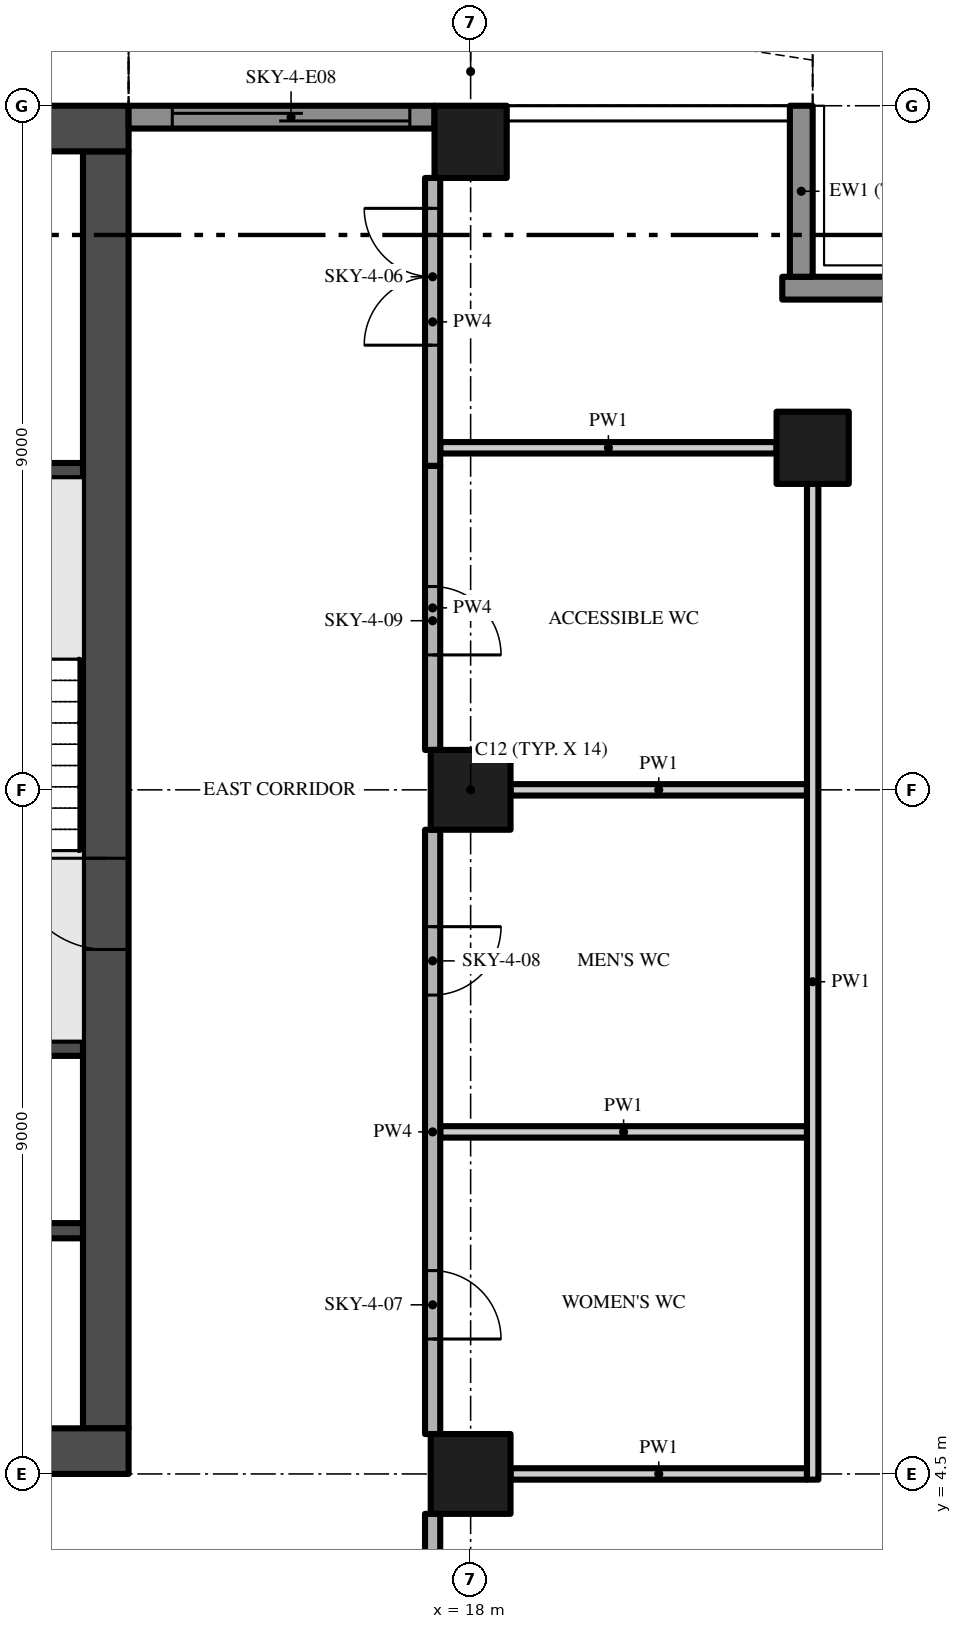
"""IFC4 building model, lengths in metres.
Left out: names, types, materials, properties, quantities, classifications, styles, units other than length and angle.
Written with IfcOpenShell. Run it as: python <this file> out.ifc"""

import sys

from ifc_helpers import new_model, si_unit, direction, frame, frame_2d, origin, origin_2d, place, context, subcontext, project, spatial, polyline, rectangle, outline, extrude, element, fill, save


model = new_model("IFC4")
c1 = context("Model", 3, precision=1e-05, world=origin(), true_north=direction((0.0, 1.0)))
c2 = subcontext(c1, "Body", "Model", "MODEL_VIEW")
j1 = project(units=[si_unit("LENGTHUNIT", "METRE"), si_unit("PLANEANGLEUNIT", "RADIAN")], contexts=[c1])
p1 = place(None, origin())
s1 = spatial("IfcSite", under=j1, at=p1, CompositionType="ELEMENT")
p2 = place(p1, origin())
s2 = spatial("IfcBuilding", under=s1, at=p2, CompositionType="ELEMENT")
p3 = place(p2, frame((0.0, 0.0, 233.8)))
s3 = spatial("IfcBuildingStorey", under=s2, at=p3, CompositionType="ELEMENT", Elevation=233.8)
p4 = place(p3, frame((-13.5, 4.8, -0.3), z_axis=(0.0, 0.0, 1.0), x_axis=(1.0, 0.0, 0.0)))
e1 = element("IfcWall", 1, at=p4, inside=s3, PredefinedType="SHEAR", context=c2, shape_type="SweptSolid", body=[
    extrude(rectangle(XDim=27.0, YDim=0.6, at=frame_2d((13.5, 0.0))), origin(), (0.0, 0.0, 1.0), 5.0),
])
p5 = place(p4, frame((12.0, 0.0, 0.3)))
e2 = element("IfcOpeningElement", 2, at=p5, cuts=e1, PredefinedType="OPENING", context=c2, shape_type="SweptSolid", body=[
    extrude(rectangle(XDim=3.0, YDim=2.4, at=frame_2d((1.5, 1.2))), frame((0.0, 0.31, 0.0), z_axis=(0.0, -1.0, 0.0), x_axis=(1.0, 0.0, 0.0)), (0.0, 0.0, 1.0), 0.62),
])
p6 = place(p4, frame((4.9, 0.0, 0.3)))
e3 = element("IfcOpeningElement", 3, at=p6, cuts=e1, PredefinedType="OPENING", context=c2, shape_type="SweptSolid", body=[
    extrude(rectangle(XDim=1.2, YDim=2.2, at=frame_2d((0.6, 1.1))), frame((0.0, 0.31, 0.0), z_axis=(0.0, -1.0, 0.0), x_axis=(1.0, 0.0, 0.0)), (0.0, 0.0, 1.0), 0.62),
])
p7 = place(p4, frame((20.75, 0.0, 0.3)))
e4 = element("IfcOpeningElement", 4, at=p7, cuts=e1, PredefinedType="OPENING", context=c2, shape_type="SweptSolid", body=[
    extrude(rectangle(XDim=1.5, YDim=2.2, at=frame_2d((0.75, 1.1))), frame((0.0, 0.31, 0.0), z_axis=(0.0, -1.0, 0.0), x_axis=(1.0, 0.0, 0.0)), (0.0, 0.0, 1.0), 0.62),
])
p8 = place(p4, frame((17.4, 0.0, 0.3)))
e5 = element("IfcOpeningElement", 5, at=p8, cuts=e1, PredefinedType="OPENING", context=c2, shape_type="SweptSolid", body=[
    extrude(rectangle(XDim=1.2, YDim=2.2, at=frame_2d((0.6, 1.1))), frame((0.0, 0.31, 0.0), z_axis=(0.0, -1.0, 0.0), x_axis=(1.0, 0.0, 0.0)), (0.0, 0.0, 1.0), 0.62),
])
p9 = place(p3, frame((13.2, 5.1, -0.3), z_axis=(0.0, 0.0, 1.0), x_axis=(0.0, 1.0, 0.0)))
e6 = element("IfcWall", 6, at=p9, inside=s3, PredefinedType="SHEAR", context=c2, shape_type="SweptSolid", body=[
    extrude(rectangle(XDim=16.8, YDim=0.6, at=frame_2d((8.4, 0.0))), origin(), (0.0, 0.0, 1.0), 5.0),
])
p10 = place(p9, frame((6.3, 0.0, 0.3)))
e7 = element("IfcOpeningElement", 7, at=p10, cuts=e6, PredefinedType="OPENING", context=c2, shape_type="SweptSolid", body=[
    extrude(rectangle(XDim=1.2, YDim=2.2, at=frame_2d((0.6, 1.1))), frame((0.0, 0.31, 0.0), z_axis=(0.0, -1.0, 0.0), x_axis=(1.0, 0.0, 0.0)), (0.0, 0.0, 1.0), 0.62),
])
p11 = place(p3, frame((13.5, 22.2, -0.3), z_axis=(0.0, 0.0, 1.0), x_axis=(-1.0, 0.0, 0.0)))
e8 = element("IfcWall", 8, at=p11, inside=s3, PredefinedType="SHEAR", context=c2, shape_type="SweptSolid", body=[
    extrude(rectangle(XDim=27.0, YDim=0.6, at=frame_2d((13.5, 0.0))), origin(), (0.0, 0.0, 1.0), 5.0),
])
p12 = place(p3, frame((18.0, 13.5, 0.0), z_axis=(0.0, 0.0, 1.0), x_axis=(1.0, 0.0, 0.0)))
e9 = element("IfcColumn", 9, at=p12, inside=s3, PredefinedType="COLUMN", context=c2, shape_type="SweptSolid", body=[
    extrude(rectangle(XDim=1.05, YDim=1.05, at=origin_2d()), origin(), (0.0, 0.0, 1.0), 4.7),
])
p13 = place(p3, frame((18.0, 22.025, 0.0), z_axis=(0.0, 0.0, 1.0), x_axis=(1.0, 0.0, 0.0)))
e10 = element("IfcColumn", 10, at=p13, inside=s3, PredefinedType="COLUMN", context=c2, shape_type="SweptSolid", body=[
    extrude(rectangle(XDim=0.95, YDim=0.95, at=origin_2d()), origin(), (0.0, 0.0, 1.0), 4.7),
])
p14 = place(p3, frame((18.0, 4.5, 0.0), z_axis=(0.0, 0.0, 1.0), x_axis=(1.0, 0.0, 0.0)))
e11 = element("IfcColumn", 11, at=p14, inside=s3, PredefinedType="COLUMN", context=c2, shape_type="SweptSolid", body=[
    extrude(rectangle(XDim=1.05, YDim=1.05, at=origin_2d()), origin(), (0.0, 0.0, 1.0), 4.7),
])
p15 = place(p3, frame((22.5, 18.0, 0.0), z_axis=(0.0, 0.0, 1.0), x_axis=(1.0, 0.0, 0.0)))
e12 = element("IfcColumn", 12, at=p15, inside=s3, PredefinedType="COLUMN", context=c2, shape_type="SweptSolid", body=[
    extrude(rectangle(XDim=0.95, YDim=0.95, at=origin_2d()), origin(), (0.0, 0.0, 1.0), 4.7),
])
p16 = place(p3, frame((22.1, 20.1, 0.0), z_axis=(0.0, 0.0, 1.0), x_axis=(1.0, 0.0, 0.0)))
e13 = element("IfcWall", 13, at=p16, inside=s3, PredefinedType="SOLIDWALL", context=c2, shape_type="SweptSolid", body=[
    extrude(rectangle(XDim=2.35, YDim=0.3, at=frame_2d((1.175, 0.0))), origin(), (0.0, 0.0, 1.0), 4.7),
])
p17 = place(p3, frame((22.35, 22.5, 0.0), z_axis=(0.0, 0.0, 1.0), x_axis=(0.0, -1.0, 0.0)))
e14 = element("IfcWall", 14, at=p17, inside=s3, PredefinedType="SOLIDWALL", context=c2, shape_type="SweptSolid", body=[
    extrude(rectangle(XDim=2.25, YDim=0.3, at=frame_2d((1.125, 0.0))), origin(), (0.0, 0.0, 1.0), 4.7),
])
p18 = place(p3, frame((13.5, 22.35, 0.0), z_axis=(0.0, 0.0, 1.0), x_axis=(1.0, 0.0, 0.0)))
e15 = element("IfcWall", 15, at=p18, inside=s3, PredefinedType="SOLIDWALL", context=c2, shape_type="SweptSolid", body=[
    extrude(rectangle(XDim=4.025, YDim=0.3, at=frame_2d((2.013, 0.0))), origin(), (0.0, 0.0, 1.0), 4.7),
])
p19 = place(p18, frame((0.575, 0.0, 0.0)))
e16 = element("IfcOpeningElement", 16, at=p19, cuts=e15, PredefinedType="OPENING", context=c2, shape_type="SweptSolid", body=[
    extrude(rectangle(XDim=3.125, YDim=2.4, at=frame_2d((1.562, 1.2))), frame((0.0, 0.16, 0.0), z_axis=(0.0, -1.0, 0.0), x_axis=(1.0, 0.0, 0.0)), (0.0, 0.0, 1.0), 0.32),
])
p20 = place(p3, origin())
e17 = element("IfcWall", 17, at=p20, inside=s3, PredefinedType="USERDEFINED", context=c2, shape_type="SweptSolid", body=[
    extrude(outline(polyline([(22.5, 23.1), (21.0, 23.329), (19.5, 23.929), (18.0, 24.671), (16.5, 25.271), (15.0, 25.5), (13.5, 25.271), (13.538, 25.024), (15.0, 25.247), (16.434, 25.028), (17.898, 24.442), (19.398, 23.701), (20.934, 23.086), (22.462, 22.853), (22.5, 23.1)])), origin(), (0.0, 0.0, 1.0), 0.9),
])
for number, where, z_axis, x_axis in (
    (18, (9.65, 7.7, 0.0), (0.0, 0.0, 1.0), (1.0, 0.0, 0.0)),
    (19, (9.65, 10.1, 0.0), (0.0, 0.0, 1.0), (1.0, 0.0, 0.0)),
    (20, (9.65, 17.7, 0.0), (0.0, 0.0, 1.0), (1.0, 0.0, 0.0)),
):
    element("IfcWall", number, at=place(p3, frame(where, z_axis=z_axis, x_axis=x_axis)), inside=s3, PredefinedType="SHEAR", context=c2, shape_type="SweptSolid", body=[
        extrude(rectangle(XDim=3.25, YDim=0.2, at=frame_2d((1.625, 0.0))), origin(), (0.0, 0.0, 1.0), 4.7),
    ])
p21 = place(p3, frame((18.525, 4.5, 0.0), z_axis=(0.0, 0.0, 1.0), x_axis=(1.0, 0.0, 0.0)))
e21 = element("IfcWall", 21, at=p21, inside=s3, PredefinedType="PARTITIONING", context=c2, shape_type="SweptSolid", body=[
    extrude(rectangle(XDim=3.9, YDim=0.15, at=frame_2d((1.95, 0.0))), origin(), (0.0, 0.0, 1.0), 4.7),
])
p22 = place(p3, frame((17.6, 9.0, 0.0), z_axis=(0.0, 0.0, 1.0), x_axis=(1.0, 0.0, 0.0)))
e22 = element("IfcWall", 22, at=p22, inside=s3, PredefinedType="PARTITIONING", context=c2, shape_type="SweptSolid", body=[
    extrude(rectangle(XDim=4.825, YDim=0.15, at=frame_2d((2.413, 0.0))), origin(), (0.0, 0.0, 1.0), 4.7),
])
p23 = place(p3, frame((18.525, 13.5, 0.0), z_axis=(0.0, 0.0, 1.0), x_axis=(1.0, 0.0, 0.0)))
e23 = element("IfcWall", 23, at=p23, inside=s3, PredefinedType="PARTITIONING", context=c2, shape_type="SweptSolid", body=[
    extrude(rectangle(XDim=3.9, YDim=0.15, at=frame_2d((1.95, 0.0))), origin(), (0.0, 0.0, 1.0), 4.7),
])
p24 = place(p3, frame((17.6, 18.0, 0.0), z_axis=(0.0, 0.0, 1.0), x_axis=(1.0, 0.0, 0.0)))
e24 = element("IfcWall", 24, at=p24, inside=s3, PredefinedType="PARTITIONING", context=c2, shape_type="SweptSolid", body=[
    extrude(rectangle(XDim=4.425, YDim=0.15, at=frame_2d((2.212, 0.0))), origin(), (0.0, 0.0, 1.0), 4.7),
])
p25 = place(p3, frame((17.5, -0.175, 0.0), z_axis=(0.0, 0.0, 1.0), x_axis=(0.0, 1.0, 0.0)))
e25 = element("IfcWall", 25, at=p25, inside=s3, PredefinedType="PARTITIONING", context=c2, shape_type="SweptSolid", body=[
    extrude(rectangle(XDim=4.15, YDim=0.2, at=frame_2d((2.075, 0.0))), origin(), (0.0, 0.0, 1.0), 4.7),
])
p26 = place(p25, frame((1.525, 0.0, 0.0)))
e26 = element("IfcOpeningElement", 26, at=p26, cuts=e25, PredefinedType="OPENING", context=c2, shape_type="SweptSolid", body=[
    extrude(rectangle(XDim=1.8, YDim=2.4, at=frame_2d((0.9, 1.2))), frame((0.0, 0.11, 0.0), z_axis=(0.0, -1.0, 0.0), x_axis=(1.0, 0.0, 0.0)), (0.0, 0.0, 1.0), 0.22),
])
p27 = place(p3, frame((17.5, 12.975, 0.0), z_axis=(0.0, 0.0, 1.0), x_axis=(0.0, -1.0, 0.0)))
e27 = element("IfcWall", 27, at=p27, inside=s3, PredefinedType="PARTITIONING", context=c2, shape_type="SweptSolid", body=[
    extrude(rectangle(XDim=7.95, YDim=0.2, at=frame_2d((3.975, 0.0))), origin(), (0.0, 0.0, 1.0), 4.7),
])
p28 = place(p27, frame((5.8, 0.0, 0.0)))
e28 = element("IfcOpeningElement", 28, at=p28, cuts=e27, PredefinedType="OPENING", context=c2, shape_type="SweptSolid", body=[
    extrude(rectangle(XDim=0.9, YDim=2.1, at=frame_2d((0.45, 1.05))), frame((0.0, 0.11, 0.0), z_axis=(0.0, -1.0, 0.0), x_axis=(1.0, 0.0, 0.0)), (0.0, 0.0, 1.0), 0.22),
])
p29 = place(p27, frame((1.275, 0.0, 0.0)))
e29 = element("IfcOpeningElement", 29, at=p29, cuts=e27, PredefinedType="OPENING", context=c2, shape_type="SweptSolid", body=[
    extrude(rectangle(XDim=0.9, YDim=2.1, at=frame_2d((0.45, 1.05))), frame((0.0, 0.11, 0.0), z_axis=(0.0, -1.0, 0.0), x_axis=(1.0, 0.0, 0.0)), (0.0, 0.0, 1.0), 0.22),
])
p30 = place(p3, frame((17.5, 17.762, 0.0), z_axis=(0.0, 0.0, 1.0), x_axis=(0.0, -1.0, 0.0)))
e30 = element("IfcWall", 30, at=p30, inside=s3, PredefinedType="PARTITIONING", context=c2, shape_type="SweptSolid", body=[
    extrude(rectangle(XDim=3.737, YDim=0.2, at=frame_2d((1.869, 0.0))), origin(), (0.0, 0.0, 1.0), 4.7),
])
p31 = place(p30, frame((1.587, 0.0, 0.0)))
e31 = element("IfcOpeningElement", 31, at=p31, cuts=e30, PredefinedType="OPENING", context=c2, shape_type="SweptSolid", body=[
    extrude(rectangle(XDim=0.9, YDim=2.1, at=frame_2d((0.45, 1.05))), frame((0.0, 0.11, 0.0), z_axis=(0.0, -1.0, 0.0), x_axis=(1.0, 0.0, 0.0)), (0.0, 0.0, 1.0), 0.22),
])
p32 = place(p3, frame((17.5, 17.762, 0.0), z_axis=(0.0, 0.0, 1.0), x_axis=(0.0, 1.0, 0.0)))
e32 = element("IfcWall", 32, at=p32, inside=s3, PredefinedType="PARTITIONING", context=c2, shape_type="SweptSolid", body=[
    extrude(rectangle(XDim=3.788, YDim=0.2, at=frame_2d((1.894, 0.0))), origin(), (0.0, 0.0, 1.0), 4.7),
])
p33 = place(p32, frame((1.587, 0.0, 0.0)))
e33 = element("IfcOpeningElement", 33, at=p33, cuts=e32, PredefinedType="OPENING", context=c2, shape_type="SweptSolid", body=[
    extrude(rectangle(XDim=1.8, YDim=2.4, at=frame_2d((0.9, 1.2))), frame((0.0, 0.11, 0.0), z_axis=(0.0, -1.0, 0.0), x_axis=(1.0, 0.0, 0.0)), (0.0, 0.0, 1.0), 0.22),
])
p34 = place(p3, frame((22.5, 4.425, 0.0), z_axis=(0.0, 0.0, 1.0), x_axis=(0.0, 1.0, 0.0)))
e34 = element("IfcWall", 34, at=p34, inside=s3, PredefinedType="PARTITIONING", context=c2, shape_type="SweptSolid", body=[
    extrude(rectangle(XDim=13.1, YDim=0.15, at=frame_2d((6.55, 0.0))), origin(), (0.0, 0.0, 1.0), 4.7),
])
p35 = place(p19, origin())
e35 = element("IfcDoor", 35, at=p35, inside=s3, OperationType="SINGLE_SWING_LEFT", PredefinedType="DOOR", context=c2, shape_type="SweptSolid", body=[
    extrude(rectangle(XDim=3.125, YDim=2.4, at=frame_2d((1.562, 1.2))), frame((0.0, 0.025, 0.0), z_axis=(0.0, -1.0, 0.0), x_axis=(1.0, 0.0, 0.0)), (0.0, 0.0, 1.0), 0.05),
])
fill(e16, e35)
p36 = place(p10, frame((1.2, 0.0, 0.0), z_axis=(0.0, 0.0, 1.0), x_axis=(-1.0, 0.0, 0.0)))
e36 = element("IfcDoor", 36, at=p36, inside=s3, OperationType="SINGLE_SWING_LEFT", PredefinedType="DOOR", context=c2, shape_type="SweptSolid", body=[
    extrude(rectangle(XDim=1.2, YDim=2.2, at=frame_2d((0.6, 1.1))), frame((0.0, 0.025, 0.0), z_axis=(0.0, -1.0, 0.0), x_axis=(1.0, 0.0, 0.0)), (0.0, 0.0, 1.0), 0.05),
])
fill(e7, e36)
p37 = place(p33, origin())
e37 = element("IfcDoor", 37, at=p37, inside=s3, OperationType="DOUBLE_DOOR_SINGLE_SWING", PredefinedType="DOOR", context=c2, shape_type="SweptSolid", body=[
    extrude(rectangle(XDim=1.8, YDim=2.4, at=frame_2d((0.9, 1.2))), frame((0.0, 0.025, 0.0), z_axis=(0.0, -1.0, 0.0), x_axis=(1.0, 0.0, 0.0)), (0.0, 0.0, 1.0), 0.05),
])
fill(e33, e37)
p38 = place(p28, origin())
e38 = element("IfcDoor", 38, at=p38, inside=s3, OperationType="SINGLE_SWING_RIGHT", PredefinedType="DOOR", context=c2, shape_type="SweptSolid", body=[
    extrude(rectangle(XDim=0.9, YDim=2.1, at=frame_2d((0.45, 1.05))), frame((0.0, 0.025, 0.0), z_axis=(0.0, -1.0, 0.0), x_axis=(1.0, 0.0, 0.0)), (0.0, 0.0, 1.0), 0.05),
])
fill(e28, e38)
p39 = place(p29, origin())
e39 = element("IfcDoor", 39, at=p39, inside=s3, OperationType="SINGLE_SWING_LEFT", PredefinedType="DOOR", context=c2, shape_type="SweptSolid", body=[
    extrude(rectangle(XDim=0.9, YDim=2.1, at=frame_2d((0.45, 1.05))), frame((0.0, 0.025, 0.0), z_axis=(0.0, -1.0, 0.0), x_axis=(1.0, 0.0, 0.0)), (0.0, 0.0, 1.0), 0.05),
])
fill(e29, e39)
p40 = place(p31, origin())
e40 = element("IfcDoor", 40, at=p40, inside=s3, OperationType="SINGLE_SWING_RIGHT", PredefinedType="DOOR", context=c2, shape_type="SweptSolid", body=[
    extrude(rectangle(XDim=0.9, YDim=2.1, at=frame_2d((0.45, 1.05))), frame((0.0, 0.025, 0.0), z_axis=(0.0, -1.0, 0.0), x_axis=(1.0, 0.0, 0.0)), (0.0, 0.0, 1.0), 0.05),
])
fill(e31, e40)
save(model, sys.argv[1])
